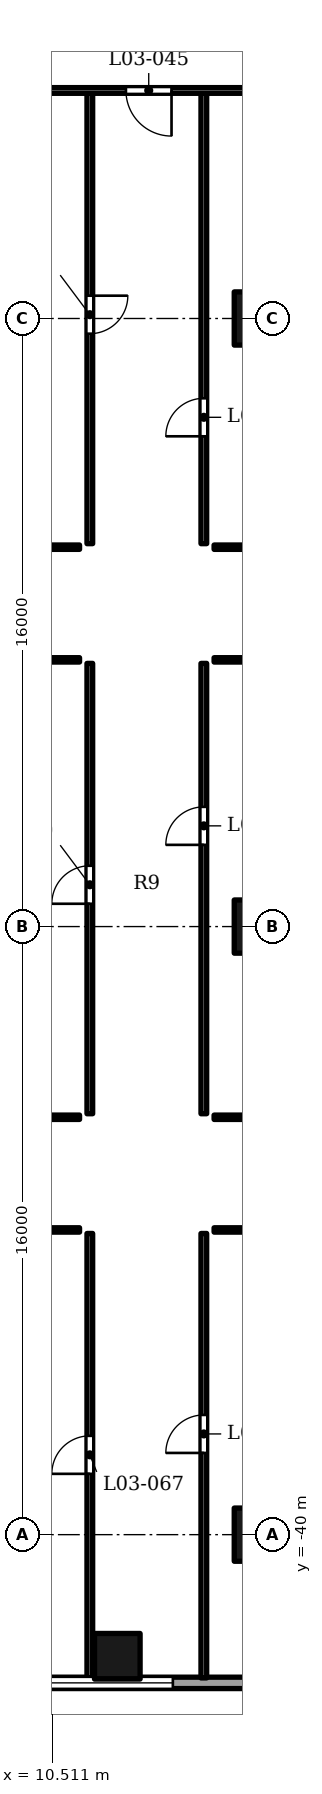
"""IFC4 building model, lengths in metres.
Left out: names, types, materials, properties, quantities, classifications, styles, units other than length and angle.
Written with IfcOpenShell. Run it as: python <this file> out.ifc"""

import sys

from ifc_helpers import new_model, si_unit, direction, frame, frame_2d, origin, origin_2d, place, context, subcontext, project, spatial, rectangle, extrude, element, fill, save


model = new_model("IFC4")
c1 = context("Model", 3, precision=1e-05, world=origin(), true_north=direction((0.0, 1.0)))
c2 = subcontext(c1, "Body", "Model", "MODEL_VIEW")
j1 = project(units=[si_unit("LENGTHUNIT", "METRE"), si_unit("PLANEANGLEUNIT", "RADIAN")], contexts=[c1])
p1 = place(None, origin())
s1 = spatial("IfcSite", under=j1, at=p1, CompositionType="ELEMENT")
p2 = place(p1, origin())
s2 = spatial("IfcBuilding", under=s1, at=p2, CompositionType="ELEMENT")
p3 = place(p2, frame((0.0, 0.0, 29.0)))
s3 = spatial("IfcBuildingStorey", under=s2, at=p3, CompositionType="ELEMENT", Elevation=29.0)
for number, where, z_axis, x_axis in (
    (1, (16.0, -40.0, 0.0), (0.0, 0.0, 1.0), (1.0, 0.0, 0.0)),
    (2, (16.0, -24.0, 0.0), (0.0, 0.0, 1.0), (1.0, 0.0, 0.0)),
    (3, (16.0, -8.0, 0.0), (0.0, 0.0, 1.0), (1.0, 0.0, 0.0)),
):
    element("IfcColumn", number, at=place(p3, frame(where, z_axis=z_axis, x_axis=x_axis)), inside=s3, PredefinedType="COLUMN", context=c2, shape_type="SweptSolid", body=[
        extrude(rectangle(XDim=1.4, YDim=1.4, at=origin_2d()), origin(), (0.0, 0.0, 1.0), 5.5),
    ])
p4 = place(p3, frame((12.223, -43.2, 0.0), z_axis=(0.0, 0.0, 1.0), x_axis=(1.0, 0.0, 0.0)))
e4 = element("IfcColumn", 4, at=p4, inside=s3, PredefinedType="COLUMN", context=c2, shape_type="SweptSolid", body=[
    extrude(rectangle(XDim=1.2, YDim=1.2, at=origin_2d()), origin(), (0.0, 0.0, 1.0), 5.5),
])
p5 = place(p3, frame((7.79, -43.9, 0.0), z_axis=(0.0, 0.0, 1.0), x_axis=(1.0, 0.0, 0.0)))
e5 = element("IfcWall", 5, at=p5, inside=s3, PredefinedType="SOLIDWALL", context=c2, shape_type="SweptSolid", body=[
    extrude(rectangle(XDim=7.79, YDim=0.3, at=frame_2d((3.895, 0.0))), origin(), (0.0, 0.0, 1.0), 4.1),
])
p6 = place(p5, frame((1.895, 0.0, 1.0)))
e6 = element("IfcOpeningElement", 6, at=p6, cuts=e5, PredefinedType="OPENING", context=c2, shape_type="SweptSolid", body=[
    extrude(rectangle(XDim=4.0, YDim=1.8, at=frame_2d((2.0, 0.9))), frame((0.0, 0.16, 0.0), z_axis=(0.0, -1.0, 0.0), x_axis=(1.0, 0.0, 0.0)), (0.0, 0.0, 1.0), 0.32),
])
p7 = place(p3, frame((11.5, -43.77, 0.0), z_axis=(0.0, 0.0, 1.0), x_axis=(0.0, 1.0, 0.0)))
e7 = element("IfcWall", 7, at=p7, inside=s3, PredefinedType="PARTITIONING", context=c2, shape_type="SweptSolid", body=[
    extrude(rectangle(XDim=11.695, YDim=0.15, at=frame_2d((5.848, 0.0))), origin(), (0.0, 0.0, 1.0), 3.85),
])
p8 = place(p7, frame((5.37, 0.0, 0.0)))
e8 = element("IfcOpeningElement", 8, at=p8, cuts=e7, PredefinedType="OPENING", context=c2, shape_type="SweptSolid", body=[
    extrude(rectangle(XDim=1.0, YDim=2.1, at=frame_2d((0.5, 1.05))), frame((0.0, 0.085, 0.0), z_axis=(0.0, -1.0, 0.0), x_axis=(1.0, 0.0, 0.0)), (0.0, 0.0, 1.0), 0.17),
])
p9 = place(p3, frame((14.5, -43.77, 0.0), z_axis=(0.0, 0.0, 1.0), x_axis=(0.0, 1.0, 0.0)))
e9 = element("IfcWall", 9, at=p9, inside=s3, PredefinedType="PARTITIONING", context=c2, shape_type="SweptSolid", body=[
    extrude(rectangle(XDim=11.695, YDim=0.15, at=frame_2d((5.848, 0.0))), origin(), (0.0, 0.0, 1.0), 3.85),
])
p10 = place(p9, frame((5.92, 0.0, 0.0)))
e10 = element("IfcOpeningElement", 10, at=p10, cuts=e9, PredefinedType="OPENING", context=c2, shape_type="SweptSolid", body=[
    extrude(rectangle(XDim=1.0, YDim=2.1, at=frame_2d((0.5, 1.05))), frame((0.0, 0.085, 0.0), z_axis=(0.0, -1.0, 0.0), x_axis=(1.0, 0.0, 0.0)), (0.0, 0.0, 1.0), 0.17),
])
p11 = place(p3, frame((-11.23, -31.982, 0.0), z_axis=(0.0, 0.0, 1.0), x_axis=(1.0, 0.0, 0.0)))
e11 = element("IfcWall", 11, at=p11, inside=s3, PredefinedType="PARTITIONING", context=c2, shape_type="SweptSolid", body=[
    extrude(rectangle(XDim=22.46, YDim=0.115, at=frame_2d((11.23, 0.0))), origin(), (0.0, 0.0, 1.0), 3.85),
])
p12 = place(p11, frame((5.88, 0.0, 0.0)))
e12 = element("IfcOpeningElement", 12, at=p12, cuts=e11, PredefinedType="OPENING", context=c2, shape_type="SweptSolid", body=[
    extrude(rectangle(XDim=1.0, YDim=2.1, at=frame_2d((0.5, 1.05))), frame((0.0, 0.067, 0.0), z_axis=(0.0, -1.0, 0.0), x_axis=(1.0, 0.0, 0.0)), (0.0, 0.0, 1.0), 0.135),
])
p13 = place(p11, frame((15.63, 0.0, 0.0)))
e13 = element("IfcOpeningElement", 13, at=p13, cuts=e11, PredefinedType="OPENING", context=c2, shape_type="SweptSolid", body=[
    extrude(rectangle(XDim=1.0, YDim=2.1, at=frame_2d((0.5, 1.05))), frame((0.0, 0.067, 0.0), z_axis=(0.0, -1.0, 0.0), x_axis=(1.0, 0.0, 0.0)), (0.0, 0.0, 1.0), 0.135),
])
p14 = place(p3, frame((14.77, -31.982, 0.0), z_axis=(0.0, 0.0, 1.0), x_axis=(1.0, 0.0, 0.0)))
e14 = element("IfcWall", 14, at=p14, inside=s3, PredefinedType="PARTITIONING", context=c2, shape_type="SweptSolid", body=[
    extrude(rectangle(XDim=18.69, YDim=0.115, at=frame_2d((9.345, 0.0))), origin(), (0.0, 0.0, 1.0), 3.85),
])
p15 = place(p14, frame((13.479, 0.0, 0.0)))
e15 = element("IfcOpeningElement", 15, at=p15, cuts=e14, PredefinedType="OPENING", context=c2, shape_type="SweptSolid", body=[
    extrude(rectangle(XDim=1.0, YDim=2.1, at=frame_2d((0.5, 1.05))), frame((0.0, 0.067, 0.0), z_axis=(0.0, -1.0, 0.0), x_axis=(1.0, 0.0, 0.0)), (0.0, 0.0, 1.0), 0.135),
])
p16 = place(p3, frame((1.6, -29.018, 0.0), z_axis=(0.0, 0.0, 1.0), x_axis=(1.0, 0.0, 0.0)))
e16 = element("IfcWall", 16, at=p16, inside=s3, PredefinedType="PARTITIONING", context=c2, shape_type="SweptSolid", body=[
    extrude(rectangle(XDim=9.63, YDim=0.115, at=frame_2d((4.815, 0.0))), origin(), (0.0, 0.0, 1.0), 4.15),
])
p17 = place(p3, frame((14.77, -29.018, 0.0), z_axis=(0.0, 0.0, 1.0), x_axis=(1.0, 0.0, 0.0)))
e17 = element("IfcWall", 17, at=p17, inside=s3, PredefinedType="PARTITIONING", context=c2, shape_type="SweptSolid", body=[
    extrude(rectangle(XDim=18.69, YDim=0.115, at=frame_2d((9.345, 0.0))), origin(), (0.0, 0.0, 1.0), 3.85),
])
p18 = place(p3, frame((11.5, -28.925, 0.0), z_axis=(0.0, 0.0, 1.0), x_axis=(0.0, 1.0, 0.0)))
e18 = element("IfcWall", 18, at=p18, inside=s3, PredefinedType="PARTITIONING", context=c2, shape_type="SweptSolid", body=[
    extrude(rectangle(XDim=11.85, YDim=0.15, at=frame_2d((5.925, 0.0))), origin(), (0.0, 0.0, 1.0), 3.85),
])
p19 = place(p18, frame((5.525, 0.0, 0.0)))
e19 = element("IfcOpeningElement", 19, at=p19, cuts=e18, PredefinedType="OPENING", context=c2, shape_type="SweptSolid", body=[
    extrude(rectangle(XDim=1.0, YDim=2.1, at=frame_2d((0.5, 1.05))), frame((0.0, 0.085, 0.0), z_axis=(0.0, -1.0, 0.0), x_axis=(1.0, 0.0, 0.0)), (0.0, 0.0, 1.0), 0.17),
])
p20 = place(p3, frame((14.5, -28.925, 0.0), z_axis=(0.0, 0.0, 1.0), x_axis=(0.0, 1.0, 0.0)))
e20 = element("IfcWall", 20, at=p20, inside=s3, PredefinedType="PARTITIONING", context=c2, shape_type="SweptSolid", body=[
    extrude(rectangle(XDim=11.85, YDim=0.15, at=frame_2d((5.925, 0.0))), origin(), (0.0, 0.0, 1.0), 3.85),
])
p21 = place(p20, frame((7.075, 0.0, 0.0)))
e21 = element("IfcOpeningElement", 21, at=p21, cuts=e20, PredefinedType="OPENING", context=c2, shape_type="SweptSolid", body=[
    extrude(rectangle(XDim=1.0, YDim=2.1, at=frame_2d((0.5, 1.05))), frame((0.0, 0.085, 0.0), z_axis=(0.0, -1.0, 0.0), x_axis=(1.0, 0.0, 0.0)), (0.0, 0.0, 1.0), 0.17),
])
p22 = place(p3, frame((-11.23, -16.982, 0.0), z_axis=(0.0, 0.0, 1.0), x_axis=(1.0, 0.0, 0.0)))
e22 = element("IfcWall", 22, at=p22, inside=s3, PredefinedType="PARTITIONING", context=c2, shape_type="SweptSolid", body=[
    extrude(rectangle(XDim=22.46, YDim=0.115, at=frame_2d((11.23, 0.0))), origin(), (0.0, 0.0, 1.0), 3.85),
])
p23 = place(p22, frame((7.88, 0.0, 0.0)))
e23 = element("IfcOpeningElement", 23, at=p23, cuts=e22, PredefinedType="OPENING", context=c2, shape_type="SweptSolid", body=[
    extrude(rectangle(XDim=1.0, YDim=2.1, at=frame_2d((0.5, 1.05))), frame((0.0, 0.067, 0.0), z_axis=(0.0, -1.0, 0.0), x_axis=(1.0, 0.0, 0.0)), (0.0, 0.0, 1.0), 0.135),
])
p24 = place(p22, frame((13.63, 0.0, 0.0)))
e24 = element("IfcOpeningElement", 24, at=p24, cuts=e22, PredefinedType="OPENING", context=c2, shape_type="SweptSolid", body=[
    extrude(rectangle(XDim=1.0, YDim=2.1, at=frame_2d((0.5, 1.05))), frame((0.0, 0.067, 0.0), z_axis=(0.0, -1.0, 0.0), x_axis=(1.0, 0.0, 0.0)), (0.0, 0.0, 1.0), 0.135),
])
p25 = place(p3, frame((14.77, -16.982, 0.0), z_axis=(0.0, 0.0, 1.0), x_axis=(1.0, 0.0, 0.0)))
e25 = element("IfcWall", 25, at=p25, inside=s3, PredefinedType="PARTITIONING", context=c2, shape_type="SweptSolid", body=[
    extrude(rectangle(XDim=18.905, YDim=0.115, at=frame_2d((9.453, 0.0))), origin(), (0.0, 0.0, 1.0), 3.85),
])
p26 = place(p25, frame((13.48, 0.0, 0.0)))
e26 = element("IfcOpeningElement", 26, at=p26, cuts=e25, PredefinedType="OPENING", context=c2, shape_type="SweptSolid", body=[
    extrude(rectangle(XDim=1.0, YDim=2.1, at=frame_2d((0.5, 1.05))), frame((0.0, 0.067, 0.0), z_axis=(0.0, -1.0, 0.0), x_axis=(1.0, 0.0, 0.0)), (0.0, 0.0, 1.0), 0.135),
])
p27 = place(p3, frame((-11.23, -14.018, 0.0), z_axis=(0.0, 0.0, 1.0), x_axis=(1.0, 0.0, 0.0)))
e27 = element("IfcWall", 27, at=p27, inside=s3, PredefinedType="PARTITIONING", context=c2, shape_type="SweptSolid", body=[
    extrude(rectangle(XDim=22.46, YDim=0.115, at=frame_2d((11.23, 0.0))), origin(), (0.0, 0.0, 1.0), 3.85),
])
p28 = place(p3, frame((14.77, -14.018, 0.0), z_axis=(0.0, 0.0, 1.0), x_axis=(1.0, 0.0, 0.0)))
e28 = element("IfcWall", 28, at=p28, inside=s3, PredefinedType="PARTITIONING", context=c2, shape_type="SweptSolid", body=[
    extrude(rectangle(XDim=18.905, YDim=0.115, at=frame_2d((9.453, 0.0))), origin(), (0.0, 0.0, 1.0), 3.85),
])
p29 = place(p28, frame((13.63, 0.0, 0.0)))
e29 = element("IfcOpeningElement", 29, at=p29, cuts=e28, PredefinedType="OPENING", context=c2, shape_type="SweptSolid", body=[
    extrude(rectangle(XDim=1.0, YDim=2.1, at=frame_2d((0.5, 1.05))), frame((0.0, 0.067, 0.0), z_axis=(0.0, -1.0, 0.0), x_axis=(1.0, 0.0, 0.0)), (0.0, 0.0, 1.0), 0.135),
])
p30 = place(p3, frame((11.5, -13.925, 0.0), z_axis=(0.0, 0.0, 1.0), x_axis=(0.0, 1.0, 0.0)))
e30 = element("IfcWall", 30, at=p30, inside=s3, PredefinedType="PARTITIONING", context=c2, shape_type="SweptSolid", body=[
    extrude(rectangle(XDim=11.85, YDim=0.15, at=frame_2d((5.925, 0.0))), origin(), (0.0, 0.0, 1.0), 3.85),
])
p31 = place(p30, frame((5.525, 0.0, 0.0)))
e31 = element("IfcOpeningElement", 31, at=p31, cuts=e30, PredefinedType="OPENING", context=c2, shape_type="SweptSolid", body=[
    extrude(rectangle(XDim=1.0, YDim=2.1, at=frame_2d((0.5, 1.05))), frame((0.0, 0.085, 0.0), z_axis=(0.0, -1.0, 0.0), x_axis=(1.0, 0.0, 0.0)), (0.0, 0.0, 1.0), 0.17),
])
p32 = place(p3, frame((14.5, -13.925, 0.0), z_axis=(0.0, 0.0, 1.0), x_axis=(0.0, 1.0, 0.0)))
e32 = element("IfcWall", 32, at=p32, inside=s3, PredefinedType="PARTITIONING", context=c2, shape_type="SweptSolid", body=[
    extrude(rectangle(XDim=11.85, YDim=0.15, at=frame_2d((5.925, 0.0))), origin(), (0.0, 0.0, 1.0), 3.85),
])
p33 = place(p32, frame((2.825, 0.0, 0.0)))
e33 = element("IfcOpeningElement", 33, at=p33, cuts=e32, PredefinedType="OPENING", context=c2, shape_type="SweptSolid", body=[
    extrude(rectangle(XDim=1.0, YDim=2.1, at=frame_2d((0.5, 1.05))), frame((0.0, 0.085, 0.0), z_axis=(0.0, -1.0, 0.0), x_axis=(1.0, 0.0, 0.0)), (0.0, 0.0, 1.0), 0.17),
])
p34 = place(p3, frame((-33.46, -2.0, 0.0), z_axis=(0.0, 0.0, 1.0), x_axis=(1.0, 0.0, 0.0)))
e34 = element("IfcWall", 34, at=p34, inside=s3, PredefinedType="PARTITIONING", context=c2, shape_type="SweptSolid", body=[
    extrude(rectangle(XDim=66.92, YDim=0.15, at=frame_2d((33.46, 0.0))), origin(), (0.0, 0.0, 1.0), 3.85),
])
p35 = place(p34, frame((19.91, 0.0, 0.0)))
e35 = element("IfcOpeningElement", 35, at=p35, cuts=e34, PredefinedType="OPENING", context=c2, shape_type="SweptSolid", body=[
    extrude(rectangle(XDim=1.2, YDim=2.1, at=frame_2d((0.6, 1.05))), frame((0.0, 0.085, 0.0), z_axis=(0.0, -1.0, 0.0), x_axis=(1.0, 0.0, 0.0)), (0.0, 0.0, 1.0), 0.17),
])
p36 = place(p34, frame((45.91, 0.0, 0.0)))
e36 = element("IfcOpeningElement", 36, at=p36, cuts=e34, PredefinedType="OPENING", context=c2, shape_type="SweptSolid", body=[
    extrude(rectangle(XDim=1.2, YDim=2.1, at=frame_2d((0.6, 1.05))), frame((0.0, 0.085, 0.0), z_axis=(0.0, -1.0, 0.0), x_axis=(1.0, 0.0, 0.0)), (0.0, 0.0, 1.0), 0.17),
])
p37 = place(p34, frame((30.11, 0.0, 0.0)))
e37 = element("IfcOpeningElement", 37, at=p37, cuts=e34, PredefinedType="OPENING", context=c2, shape_type="SweptSolid", body=[
    extrude(rectangle(XDim=1.0, YDim=2.1, at=frame_2d((0.5, 1.05))), frame((0.0, 0.085, 0.0), z_axis=(0.0, -1.0, 0.0), x_axis=(1.0, 0.0, 0.0)), (0.0, 0.0, 1.0), 0.17),
])
p38 = place(p34, frame((35.86, 0.0, 0.0)))
e38 = element("IfcOpeningElement", 38, at=p38, cuts=e34, PredefinedType="OPENING", context=c2, shape_type="SweptSolid", body=[
    extrude(rectangle(XDim=1.0, YDim=2.1, at=frame_2d((0.5, 1.05))), frame((0.0, 0.085, 0.0), z_axis=(0.0, -1.0, 0.0), x_axis=(1.0, 0.0, 0.0)), (0.0, 0.0, 1.0), 0.17),
])
p39 = place(p6, origin())
e39 = element("IfcWindow", 39, at=p39, inside=s3, PartitioningType="SINGLE_PANEL", PredefinedType="WINDOW", context=c2, shape_type="SweptSolid", body=[
    extrude(rectangle(XDim=4.0, YDim=1.8, at=frame_2d((2.0, 0.9))), frame((0.0, 0.03, 0.0), z_axis=(0.0, -1.0, 0.0), x_axis=(1.0, 0.0, 0.0)), (0.0, 0.0, 1.0), 0.06),
])
fill(e6, e39)
p40 = place(p36, origin())
e40 = element("IfcDoor", 40, at=p40, inside=s3, OperationType="SINGLE_SWING_RIGHT", PredefinedType="DOOR", context=c2, shape_type="SweptSolid", body=[
    extrude(rectangle(XDim=1.2, YDim=2.1, at=frame_2d((0.6, 1.05))), frame((0.0, 0.025, 0.0), z_axis=(0.0, -1.0, 0.0), x_axis=(1.0, 0.0, 0.0)), (0.0, 0.0, 1.0), 0.05),
])
fill(e36, e40)
p41 = place(p31, origin())
e41 = element("IfcDoor", 41, at=p41, inside=s3, OperationType="SINGLE_SWING_RIGHT", PredefinedType="DOOR", context=c2, shape_type="SweptSolid", body=[
    extrude(rectangle(XDim=1.0, YDim=2.1, at=frame_2d((0.5, 1.05))), frame((0.0, 0.025, 0.0), z_axis=(0.0, -1.0, 0.0), x_axis=(1.0, 0.0, 0.0)), (0.0, 0.0, 1.0), 0.05),
])
fill(e31, e41)
p42 = place(p33, origin())
e42 = element("IfcDoor", 42, at=p42, inside=s3, OperationType="SINGLE_SWING_LEFT", PredefinedType="DOOR", context=c2, shape_type="SweptSolid", body=[
    extrude(rectangle(XDim=1.0, YDim=2.1, at=frame_2d((0.5, 1.05))), frame((0.0, 0.025, 0.0), z_axis=(0.0, -1.0, 0.0), x_axis=(1.0, 0.0, 0.0)), (0.0, 0.0, 1.0), 0.05),
])
fill(e33, e42)
p43 = place(p19, origin())
e43 = element("IfcDoor", 43, at=p43, inside=s3, OperationType="SINGLE_SWING_LEFT", PredefinedType="DOOR", context=c2, shape_type="SweptSolid", body=[
    extrude(rectangle(XDim=1.0, YDim=2.1, at=frame_2d((0.5, 1.05))), frame((0.0, 0.025, 0.0), z_axis=(0.0, -1.0, 0.0), x_axis=(1.0, 0.0, 0.0)), (0.0, 0.0, 1.0), 0.05),
])
fill(e19, e43)
p44 = place(p21, origin())
e44 = element("IfcDoor", 44, at=p44, inside=s3, OperationType="SINGLE_SWING_LEFT", PredefinedType="DOOR", context=c2, shape_type="SweptSolid", body=[
    extrude(rectangle(XDim=1.0, YDim=2.1, at=frame_2d((0.5, 1.05))), frame((0.0, 0.025, 0.0), z_axis=(0.0, -1.0, 0.0), x_axis=(1.0, 0.0, 0.0)), (0.0, 0.0, 1.0), 0.05),
])
fill(e21, e44)
p45 = place(p8, origin())
e45 = element("IfcDoor", 45, at=p45, inside=s3, OperationType="SINGLE_SWING_LEFT", PredefinedType="DOOR", context=c2, shape_type="SweptSolid", body=[
    extrude(rectangle(XDim=1.0, YDim=2.1, at=frame_2d((0.5, 1.05))), frame((0.0, 0.025, 0.0), z_axis=(0.0, -1.0, 0.0), x_axis=(1.0, 0.0, 0.0)), (0.0, 0.0, 1.0), 0.05),
])
fill(e8, e45)
p46 = place(p10, origin())
e46 = element("IfcDoor", 46, at=p46, inside=s3, OperationType="SINGLE_SWING_LEFT", PredefinedType="DOOR", context=c2, shape_type="SweptSolid", body=[
    extrude(rectangle(XDim=1.0, YDim=2.1, at=frame_2d((0.5, 1.05))), frame((0.0, 0.025, 0.0), z_axis=(0.0, -1.0, 0.0), x_axis=(1.0, 0.0, 0.0)), (0.0, 0.0, 1.0), 0.05),
])
fill(e10, e46)
save(model, sys.argv[1])
